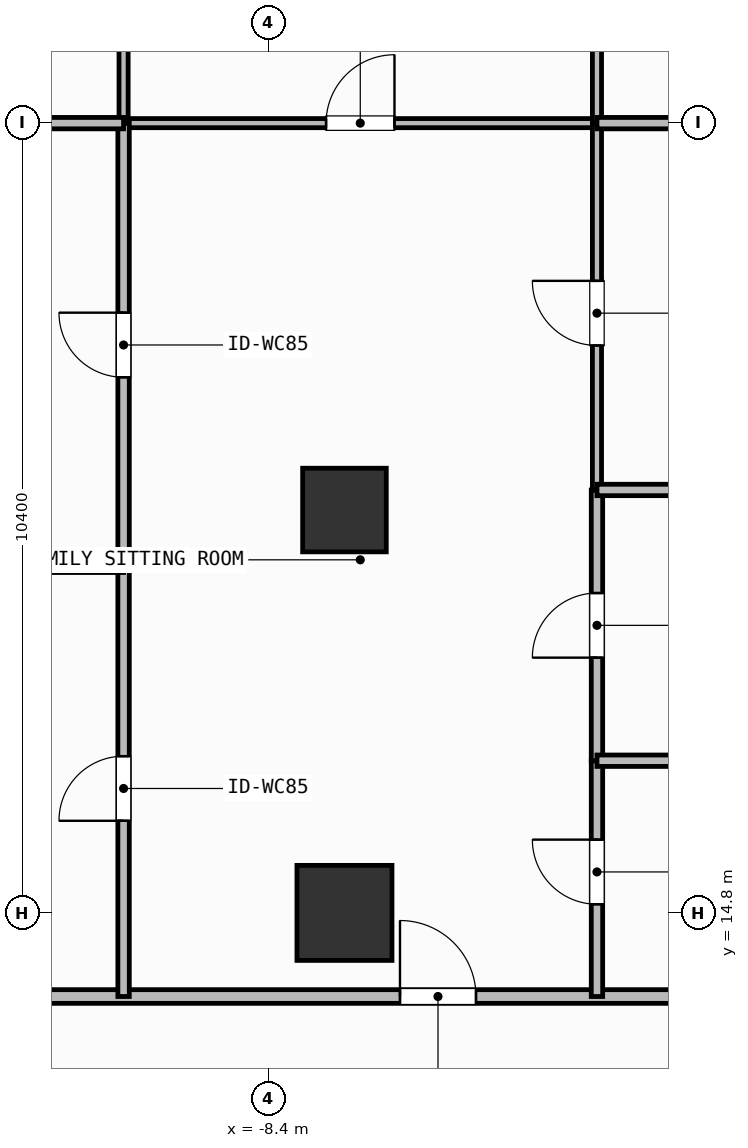
"""IFC4 building model, lengths in metres.
Left out: names, types, materials, properties, quantities, classifications, styles, units other than length and angle.
Written with IfcOpenShell. Run it as: python <this file> out.ifc"""

import sys

from ifc_helpers import new_model, si_unit, direction, frame, frame_2d, origin, origin_2d, place, context, subcontext, project, spatial, rectangle, extrude, element, fill, save


model = new_model("IFC4")
c1 = context("Model", 3, precision=1e-05, world=origin(), true_north=direction((0.0, 1.0)))
c2 = subcontext(c1, "Body", "Model", "MODEL_VIEW")
j1 = project(units=[si_unit("LENGTHUNIT", "METRE"), si_unit("PLANEANGLEUNIT", "RADIAN")], contexts=[c1])
p1 = place(None, origin())
s1 = spatial("IfcSite", under=j1, at=p1, CompositionType="ELEMENT")
p2 = place(p1, origin())
s2 = spatial("IfcBuilding", under=s1, at=p2, CompositionType="ELEMENT")
p3 = place(p2, frame((0.0, 0.0, 132.9)))
s3 = spatial("IfcBuildingStorey", under=s2, at=p3, CompositionType="ELEMENT", Elevation=132.9)
p4 = place(p3, frame((-7.4, 14.8, 0.0), z_axis=(0.0, 0.0, 1.0), x_axis=(1.0, 0.0, 0.0)))
e1 = element("IfcColumn", 1, at=p4, inside=s3, PredefinedType="COLUMN", context=c2, shape_type="SweptSolid", body=[
    extrude(rectangle(XDim=1.25, YDim=1.25, at=origin_2d()), origin(), (0.0, 0.0, 1.0), 3.9),
])
p5 = place(p3, frame((-7.4, 20.1, 0.0), z_axis=(0.0, 0.0, 1.0), x_axis=(1.0, 0.0, 0.0)))
e2 = element("IfcColumn", 2, at=p5, inside=s3, PredefinedType="COLUMN", context=c2, shape_type="SweptSolid", body=[
    extrude(rectangle(XDim=1.1, YDim=1.1, at=origin_2d()), origin(), (0.0, 0.0, 1.0), 3.9),
])
p6 = place(p3, frame((-16.32, 13.7, 0.0), z_axis=(0.0, 0.0, 1.0), x_axis=(1.0, 0.0, 0.0)))
e3 = element("IfcWall", 3, at=p6, inside=s3, PredefinedType="PARTITIONING", context=c2, shape_type="SweptSolid", body=[
    extrude(rectangle(XDim=17.794, YDim=0.18, at=frame_2d((8.897, 0.0))), origin(), (0.0, 0.0, 1.0), 3.62),
])
p7 = place(p6, frame((9.65, 0.0, 0.0)))
e4 = element("IfcOpeningElement", 4, at=p7, cuts=e3, PredefinedType="OPENING", context=c2, shape_type="SweptSolid", body=[
    extrude(rectangle(XDim=1.0, YDim=2.2, at=frame_2d((0.5, 1.1))), frame((0.0, 0.1, 0.0), z_axis=(0.0, -1.0, 0.0), x_axis=(1.0, 0.0, 0.0)), (0.0, 0.0, 1.0), 0.2),
])
p8 = place(p3, frame((-10.306, 25.19, 0.0), z_axis=(0.0, 0.0, 1.0), x_axis=(1.0, 0.0, 0.0)))
e5 = element("IfcWall", 5, at=p8, inside=s3, PredefinedType="PARTITIONING", context=c2, shape_type="SweptSolid", body=[
    extrude(rectangle(XDim=6.228, YDim=0.12, at=frame_2d((3.114, 0.0))), origin(), (0.0, 0.0, 1.0), 3.62),
])
p9 = place(p8, frame((2.664, 0.0, 0.0)))
e6 = element("IfcOpeningElement", 6, at=p9, cuts=e5, PredefinedType="OPENING", context=c2, shape_type="SweptSolid", body=[
    extrude(rectangle(XDim=0.9, YDim=2.1, at=frame_2d((0.45, 1.05))), frame((0.0, 0.07, 0.0), z_axis=(0.0, -1.0, 0.0), x_axis=(1.0, 0.0, 0.0)), (0.0, 0.0, 1.0), 0.14),
])
p10 = place(p3, frame((-10.306, 13.7, 0.0), z_axis=(0.0, 0.0, 1.0), x_axis=(0.0, 1.0, 0.0)))
e7 = element("IfcWall", 7, at=p10, inside=s3, PredefinedType="PARTITIONING", context=c2, shape_type="SweptSolid", body=[
    extrude(rectangle(XDim=5.653, YDim=0.15, at=frame_2d((2.827, 0.0))), origin(), (0.0, 0.0, 1.0), 3.62),
])
p11 = place(p10, frame((2.312, 0.0, 0.0)))
e8 = element("IfcOpeningElement", 8, at=p11, cuts=e7, PredefinedType="OPENING", context=c2, shape_type="SweptSolid", body=[
    extrude(rectangle(XDim=0.85, YDim=2.1, at=frame_2d((0.425, 1.05))), frame((0.0, 0.085, 0.0), z_axis=(0.0, -1.0, 0.0), x_axis=(1.0, 0.0, 0.0)), (0.0, 0.0, 1.0), 0.17),
])
p12 = place(p3, frame((-10.306, 19.353, 0.0), z_axis=(0.0, 0.0, 1.0), x_axis=(0.0, 1.0, 0.0)))
e9 = element("IfcWall", 9, at=p12, inside=s3, PredefinedType="PARTITIONING", context=c2, shape_type="SweptSolid", body=[
    extrude(rectangle(XDim=5.837, YDim=0.15, at=frame_2d((2.918, 0.0))), origin(), (0.0, 0.0, 1.0), 3.62),
])
p13 = place(p12, frame((2.493, 0.0, 0.0)))
e10 = element("IfcOpeningElement", 10, at=p13, cuts=e9, PredefinedType="OPENING", context=c2, shape_type="SweptSolid", body=[
    extrude(rectangle(XDim=0.85, YDim=2.1, at=frame_2d((0.425, 1.05))), frame((0.0, 0.085, 0.0), z_axis=(0.0, -1.0, 0.0), x_axis=(1.0, 0.0, 0.0)), (0.0, 0.0, 1.0), 0.17),
])
p14 = place(p3, frame((-10.306, 25.19, 0.0), z_axis=(0.0, 0.0, 1.0), x_axis=(0.0, 1.0, 0.0)))
e11 = element("IfcWall", 11, at=p14, inside=s3, PredefinedType="PARTITIONING", context=c2, shape_type="SweptSolid", body=[
    extrude(rectangle(XDim=4.24, YDim=0.12, at=frame_2d((2.12, 0.0))), origin(), (0.0, 0.0, 1.0), 3.62),
])
p15 = place(p14, frame((1.581, 0.0, 0.0)))
e12 = element("IfcOpeningElement", 12, at=p15, cuts=e11, PredefinedType="OPENING", context=c2, shape_type="SweptSolid", body=[
    extrude(rectangle(XDim=0.9, YDim=2.1, at=frame_2d((0.45, 1.05))), frame((0.0, 0.07, 0.0), z_axis=(0.0, -1.0, 0.0), x_axis=(1.0, 0.0, 0.0)), (0.0, 0.0, 1.0), 0.14),
])
p16 = place(p3, frame((-4.078, 13.7, 0.0), z_axis=(0.0, 0.0, 1.0), x_axis=(0.0, 1.0, 0.0)))
e13 = element("IfcWall", 13, at=p16, inside=s3, PredefinedType="PARTITIONING", context=c2, shape_type="SweptSolid", body=[
    extrude(rectangle(XDim=3.102, YDim=0.15, at=frame_2d((1.551, 0.0))), origin(), (0.0, 0.0, 1.0), 3.62),
])
p17 = place(p16, frame((1.214, 0.0, 0.0)))
e14 = element("IfcOpeningElement", 14, at=p17, cuts=e13, PredefinedType="OPENING", context=c2, shape_type="SweptSolid", body=[
    extrude(rectangle(XDim=0.85, YDim=2.1, at=frame_2d((0.425, 1.05))), frame((0.0, 0.085, 0.0), z_axis=(0.0, -1.0, 0.0), x_axis=(1.0, 0.0, 0.0)), (0.0, 0.0, 1.0), 0.17),
])
p18 = place(p3, frame((-4.078, 16.802, 0.0), z_axis=(0.0, 0.0, 1.0), x_axis=(0.0, 1.0, 0.0)))
e15 = element("IfcWall", 15, at=p18, inside=s3, PredefinedType="PARTITIONING", context=c2, shape_type="SweptSolid", body=[
    extrude(rectangle(XDim=3.562, YDim=0.15, at=frame_2d((1.781, 0.0))), origin(), (0.0, 0.0, 1.0), 3.62),
])
p19 = place(p18, frame((1.356, 0.0, 0.0)))
e16 = element("IfcOpeningElement", 16, at=p19, cuts=e15, PredefinedType="OPENING", context=c2, shape_type="SweptSolid", body=[
    extrude(rectangle(XDim=0.85, YDim=2.1, at=frame_2d((0.425, 1.05))), frame((0.0, 0.085, 0.0), z_axis=(0.0, -1.0, 0.0), x_axis=(1.0, 0.0, 0.0)), (0.0, 0.0, 1.0), 0.17),
])
p20 = place(p3, frame((-4.078, 20.364, 0.0), z_axis=(0.0, 0.0, 1.0), x_axis=(0.0, 1.0, 0.0)))
e17 = element("IfcWall", 17, at=p20, inside=s3, PredefinedType="PARTITIONING", context=c2, shape_type="SweptSolid", body=[
    extrude(rectangle(XDim=4.826, YDim=0.12, at=frame_2d((2.413, 0.0))), origin(), (0.0, 0.0, 1.0), 3.62),
])
p21 = place(p20, frame((1.901, 0.0, 0.0)))
e18 = element("IfcOpeningElement", 18, at=p21, cuts=e17, PredefinedType="OPENING", context=c2, shape_type="SweptSolid", body=[
    extrude(rectangle(XDim=0.85, YDim=2.1, at=frame_2d((0.425, 1.05))), frame((0.0, 0.07, 0.0), z_axis=(0.0, -1.0, 0.0), x_axis=(1.0, 0.0, 0.0)), (0.0, 0.0, 1.0), 0.14),
])
p22 = place(p3, frame((-4.078, 25.19, 0.0), z_axis=(0.0, 0.0, 1.0), x_axis=(0.0, 1.0, 0.0)))
e19 = element("IfcWall", 19, at=p22, inside=s3, PredefinedType="PARTITIONING", context=c2, shape_type="SweptSolid", body=[
    extrude(rectangle(XDim=4.24, YDim=0.12, at=frame_2d((2.12, 0.0))), origin(), (0.0, 0.0, 1.0), 3.62),
])
p23 = place(p22, frame((1.581, 0.0, 0.0)))
e20 = element("IfcOpeningElement", 20, at=p23, cuts=e19, PredefinedType="OPENING", context=c2, shape_type="SweptSolid", body=[
    extrude(rectangle(XDim=0.9, YDim=2.1, at=frame_2d((0.45, 1.05))), frame((0.0, 0.07, 0.0), z_axis=(0.0, -1.0, 0.0), x_axis=(1.0, 0.0, 0.0)), (0.0, 0.0, 1.0), 0.14),
])
p24 = place(p3, frame((-16.32, 19.353, 0.0), z_axis=(0.0, 0.0, 1.0), x_axis=(1.0, 0.0, 0.0)))
e21 = element("IfcWall", 21, at=p24, inside=s3, PredefinedType="PARTITIONING", context=c2, shape_type="SweptSolid", body=[
    extrude(rectangle(XDim=6.014, YDim=0.15, at=frame_2d((3.007, 0.0))), origin(), (0.0, 0.0, 1.0), 3.31),
])
p25 = place(p3, frame((-16.32, 25.19, 0.0), z_axis=(0.0, 0.0, 1.0), x_axis=(1.0, 0.0, 0.0)))
e22 = element("IfcWall", 22, at=p25, inside=s3, PredefinedType="PARTITIONING", context=c2, shape_type="SweptSolid", body=[
    extrude(rectangle(XDim=6.014, YDim=0.15, at=frame_2d((3.007, 0.0))), origin(), (0.0, 0.0, 1.0), 3.62),
])
p26 = place(p3, frame((-4.078, 16.802, 0.0), z_axis=(0.0, 0.0, 1.0), x_axis=(1.0, 0.0, 0.0)))
e23 = element("IfcWall", 23, at=p26, inside=s3, PredefinedType="PARTITIONING", context=c2, shape_type="SweptSolid", body=[
    extrude(rectangle(XDim=5.552, YDim=0.15, at=frame_2d((2.776, 0.0))), origin(), (0.0, 0.0, 1.0), 3.62),
])
p27 = place(p3, frame((-4.078, 20.364, 0.0), z_axis=(0.0, 0.0, 1.0), x_axis=(1.0, 0.0, 0.0)))
e24 = element("IfcWall", 24, at=p27, inside=s3, PredefinedType="PARTITIONING", context=c2, shape_type="SweptSolid", body=[
    extrude(rectangle(XDim=5.552, YDim=0.15, at=frame_2d((2.776, 0.0))), origin(), (0.0, 0.0, 1.0), 2.71),
])
p28 = place(p3, frame((-4.078, 25.19, 0.0), z_axis=(0.0, 0.0, 1.0), x_axis=(1.0, 0.0, 0.0)))
e25 = element("IfcWall", 25, at=p28, inside=s3, PredefinedType="PARTITIONING", context=c2, shape_type="SweptSolid", body=[
    extrude(rectangle(XDim=5.552, YDim=0.15, at=frame_2d((2.776, 0.0))), origin(), (0.0, 0.0, 1.0), 3.62),
])
p29 = place(p7, origin())
e26 = element("IfcDoor", 26, at=p29, inside=s3, OperationType="SINGLE_SWING_LEFT", PredefinedType="DOOR", context=c2, shape_type="SweptSolid", body=[
    extrude(rectangle(XDim=1.0, YDim=2.2, at=frame_2d((0.5, 1.1))), frame((0.0, 0.025, 0.0), z_axis=(0.0, -1.0, 0.0), x_axis=(1.0, 0.0, 0.0)), (0.0, 0.0, 1.0), 0.05),
])
fill(e4, e26)
p30 = place(p9, origin())
e27 = element("IfcDoor", 27, at=p30, inside=s3, OperationType="SINGLE_SWING_RIGHT", PredefinedType="DOOR", context=c2, shape_type="SweptSolid", body=[
    extrude(rectangle(XDim=0.9, YDim=2.1, at=frame_2d((0.45, 1.05))), frame((0.0, 0.025, 0.0), z_axis=(0.0, -1.0, 0.0), x_axis=(1.0, 0.0, 0.0)), (0.0, 0.0, 1.0), 0.05),
])
fill(e6, e27)
p31 = place(p11, origin())
e28 = element("IfcDoor", 28, at=p31, inside=s3, OperationType="SINGLE_SWING_LEFT", PredefinedType="DOOR", context=c2, shape_type="SweptSolid", body=[
    extrude(rectangle(XDim=0.85, YDim=2.1, at=frame_2d((0.425, 1.05))), frame((0.0, 0.025, 0.0), z_axis=(0.0, -1.0, 0.0), x_axis=(1.0, 0.0, 0.0)), (0.0, 0.0, 1.0), 0.05),
])
fill(e8, e28)
p32 = place(p13, origin())
e29 = element("IfcDoor", 29, at=p32, inside=s3, OperationType="SINGLE_SWING_RIGHT", PredefinedType="DOOR", context=c2, shape_type="SweptSolid", body=[
    extrude(rectangle(XDim=0.85, YDim=2.1, at=frame_2d((0.425, 1.05))), frame((0.0, 0.025, 0.0), z_axis=(0.0, -1.0, 0.0), x_axis=(1.0, 0.0, 0.0)), (0.0, 0.0, 1.0), 0.05),
])
fill(e10, e29)
p33 = place(p17, origin())
e30 = element("IfcDoor", 30, at=p33, inside=s3, OperationType="SINGLE_SWING_RIGHT", PredefinedType="DOOR", context=c2, shape_type="SweptSolid", body=[
    extrude(rectangle(XDim=0.85, YDim=2.1, at=frame_2d((0.425, 1.05))), frame((0.0, 0.025, 0.0), z_axis=(0.0, -1.0, 0.0), x_axis=(1.0, 0.0, 0.0)), (0.0, 0.0, 1.0), 0.05),
])
fill(e14, e30)
p34 = place(p19, origin())
e31 = element("IfcDoor", 31, at=p34, inside=s3, OperationType="SINGLE_SWING_LEFT", PredefinedType="DOOR", context=c2, shape_type="SweptSolid", body=[
    extrude(rectangle(XDim=0.85, YDim=2.1, at=frame_2d((0.425, 1.05))), frame((0.0, 0.025, 0.0), z_axis=(0.0, -1.0, 0.0), x_axis=(1.0, 0.0, 0.0)), (0.0, 0.0, 1.0), 0.05),
])
fill(e16, e31)
p35 = place(p21, origin())
e32 = element("IfcDoor", 32, at=p35, inside=s3, OperationType="SINGLE_SWING_RIGHT", PredefinedType="DOOR", context=c2, shape_type="SweptSolid", body=[
    extrude(rectangle(XDim=0.85, YDim=2.1, at=frame_2d((0.425, 1.05))), frame((0.0, 0.025, 0.0), z_axis=(0.0, -1.0, 0.0), x_axis=(1.0, 0.0, 0.0)), (0.0, 0.0, 1.0), 0.05),
])
fill(e18, e32)
save(model, sys.argv[1])
